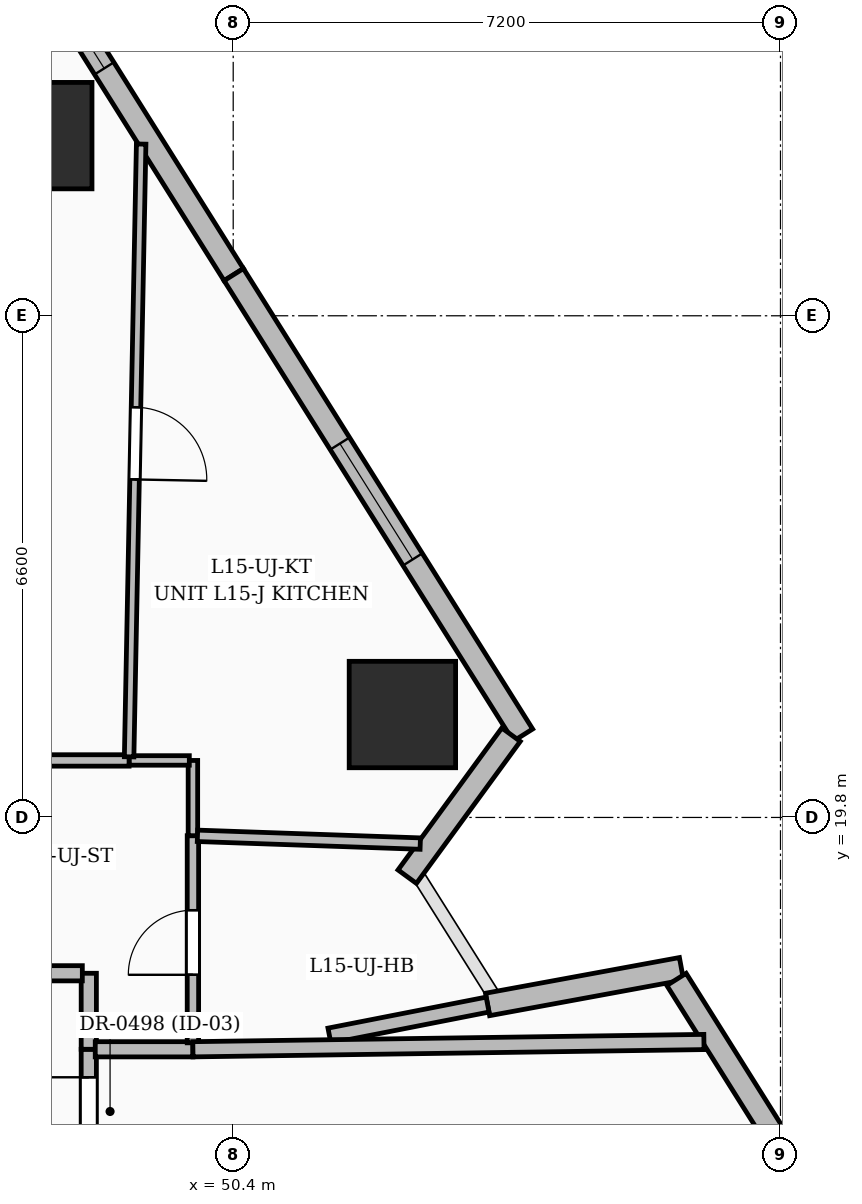
"""IFC4 building model, lengths in metres.
Left out: names, types, materials, properties, quantities, classifications, styles, units other than length and angle.
Written with IfcOpenShell. Run it as: python <this file> out.ifc"""

import sys

from ifc_helpers import new_model, si_unit, direction, frame, frame_2d, origin, origin_2d, place, context, subcontext, project, spatial, rectangle, extrude, element, fill, save


model = new_model("IFC4")
c1 = context("Model", 3, precision=1e-05, world=origin(), true_north=direction((0.0, 1.0)))
c2 = subcontext(c1, "Body", "Model", "MODEL_VIEW")
j1 = project(units=[si_unit("LENGTHUNIT", "METRE"), si_unit("PLANEANGLEUNIT", "RADIAN")], contexts=[c1])
p1 = place(None, origin())
s1 = spatial("IfcSite", under=j1, at=p1, CompositionType="ELEMENT")
p2 = place(p1, origin())
s2 = spatial("IfcBuilding", under=s1, at=p2, CompositionType="ELEMENT")
p3 = place(p2, frame((0.0, 0.0, 64.2)))
s3 = spatial("IfcBuildingStorey", under=s2, at=p3, CompositionType="ELEMENT", Elevation=64.2)
for number, where, z_axis, x_axis in (
    (1, (52.626, 21.154, 0.0), (0.0, 0.0, 1.0), (1.0, 0.0, 0.0)),
    (2, (47.842, 28.77, 0.0), (0.0, 0.0, 1.0), (1.0, 0.0, 0.0)),
):
    element("IfcColumn", number, at=place(p3, frame(where, z_axis=z_axis, x_axis=x_axis)), inside=s3, PredefinedType="COLUMN", context=c2, shape_type="SweptSolid", body=[
        extrude(rectangle(XDim=1.4, YDim=1.4, at=origin_2d()), origin(), (0.0, 0.0, 1.0), 3.6),
    ])
p4 = place(p3, frame((46.574, 33.044, 0.0), z_axis=(0.0, 0.0, 1.0), x_axis=(0.531903730452, -0.846804830839, 0.0)))
e3 = element("IfcWall", 3, at=p4, inside=s3, PredefinedType="SOLIDWALL", context=c2, shape_type="SweptSolid", body=[
    extrude(rectangle(XDim=7.207, YDim=0.3, at=frame_2d((3.604, 0.0))), origin(), (0.0, 0.0, 1.0), 3.35),
])
p5 = place(p4, frame((1.903, 0.0, 0.55)))
e4 = element("IfcOpeningElement", 4, at=p5, cuts=e3, PredefinedType="OPENING", context=c2, shape_type="SweptSolid", body=[
    extrude(rectangle(XDim=2.1, YDim=2.4, at=frame_2d((1.05, 1.2))), frame((0.0, 0.16, 0.0), z_axis=(0.0, -1.0, 0.0), x_axis=(1.0, 0.0, 0.0)), (0.0, 0.0, 1.0), 0.32),
])
p6 = place(p3, frame((50.407, 26.941, 0.0), z_axis=(0.0, 0.0, 1.0), x_axis=(0.531893353762, -0.846811348663, 0.0)))
e5 = element("IfcWall", 5, at=p6, inside=s3, PredefinedType="SOLIDWALL", context=c2, shape_type="SweptSolid", body=[
    extrude(rectangle(XDim=7.154, YDim=0.3, at=frame_2d((3.577, 0.0))), origin(), (0.0, 0.0, 1.0), 3.35),
])
p7 = place(p6, frame((2.625, 0.0, 0.6)))
e6 = element("IfcOpeningElement", 6, at=p7, cuts=e5, PredefinedType="OPENING", context=c2, shape_type="SweptSolid", body=[
    extrude(rectangle(XDim=1.8, YDim=2.1, at=frame_2d((0.9, 1.05))), frame((0.0, 0.16, 0.0), z_axis=(0.0, -1.0, 0.0), x_axis=(1.0, 0.0, 0.0)), (0.0, 0.0, 1.0), 0.32),
])
p8 = place(p3, frame((54.055, 20.889, 0.0), z_axis=(0.0, 0.0, 1.0), x_axis=(-0.590283720268, -0.80719584339, 0.0)))
e7 = element("IfcWall", 7, at=p8, inside=s3, PredefinedType="SOLIDWALL", context=c2, shape_type="SweptSolid", body=[
    extrude(rectangle(XDim=2.314, YDim=0.3, at=frame_2d((1.157, 0.0))), origin(), (0.0, 0.0, 1.0), 2.375),
])
p9 = place(p3, frame((53.746, 17.34, 0.0), z_axis=(0.0, 0.0, 1.0), x_axis=(0.983469951812, 0.181071405482, 0.0)))
e8 = element("IfcWall", 8, at=p9, inside=s3, PredefinedType="SOLIDWALL", context=c2, shape_type="SweptSolid", body=[
    extrude(rectangle(XDim=2.594, YDim=0.3, at=frame_2d((1.297, 0.0))), origin(), (0.0, 0.0, 1.0), 2.375),
])
p10 = place(p3, frame((56.232, 17.67, 0.0), z_axis=(0.0, 0.0, 1.0), x_axis=(0.531902990752, -0.846805295466, 0.0)))
e9 = element("IfcWall", 9, at=p10, inside=s3, PredefinedType="SOLIDWALL", context=c2, shape_type="SweptSolid", body=[
    extrude(rectangle(XDim=6.703, YDim=0.3, at=frame_2d((3.352, 0.0))), origin(), (0.0, 0.0, 1.0), 3.35),
])
p11 = place(p10, frame((2.9, 0.0, 0.8)))
e10 = element("IfcOpeningElement", 10, at=p11, cuts=e9, PredefinedType="OPENING", context=c2, shape_type="SweptSolid", body=[
    extrude(rectangle(XDim=1.2, YDim=1.8, at=frame_2d((0.6, 0.9))), frame((0.0, 0.16, 0.0), z_axis=(0.0, -1.0, 0.0), x_axis=(1.0, 0.0, 0.0)), (0.0, 0.0, 1.0), 0.32),
])
p12 = place(p3, frame((48.5, 14.285, 0.0), z_axis=(0.0, 0.0, 1.0), x_axis=(0.0, 1.0, 0.0)))
e11 = element("IfcWall", 11, at=p12, inside=s3, PredefinedType="PARTITIONING", context=c2, shape_type="SweptSolid", body=[
    extrude(rectangle(XDim=2.465, YDim=0.2, at=frame_2d((1.232, 0.0))), origin(), (0.0, 0.0, 1.0), 2.279),
])
p13 = place(p12, frame((1.197, 0.0, 0.0)))
e12 = element("IfcOpeningElement", 12, at=p13, cuts=e11, PredefinedType="OPENING", context=c2, shape_type="SweptSolid", body=[
    extrude(rectangle(XDim=0.9, YDim=2.1, at=frame_2d((0.45, 1.05))), frame((0.0, 0.11, 0.0), z_axis=(0.0, -1.0, 0.0), x_axis=(1.0, 0.0, 0.0)), (0.0, 0.0, 1.0), 0.22),
])
p14 = place(p3, frame((48.5, 16.75, 0.0), z_axis=(0.0, 0.0, 1.0), x_axis=(0.0, 1.0, 0.0)))
e13 = element("IfcWall", 13, at=p14, inside=s3, PredefinedType="PARTITIONING", context=c2, shape_type="SweptSolid", body=[
    extrude(rectangle(XDim=1.0, YDim=0.2, at=frame_2d((0.5, 0.0))), origin(), (0.0, 0.0, 1.0), 2.279),
])
p15 = place(p3, frame((48.415, 17.75, 0.0), z_axis=(0.0, 0.0, 1.0), x_axis=(-1.0, 0.0, 0.0)))
e14 = element("IfcWall", 14, at=p15, inside=s3, PredefinedType="PARTITIONING", context=c2, shape_type="SweptSolid", body=[
    extrude(rectangle(XDim=4.785, YDim=0.2, at=frame_2d((2.393, 0.0))), origin(), (0.0, 0.0, 1.0), 2.309),
])
p16 = place(p15, frame((1.611, 0.0, 0.0)))
e15 = element("IfcOpeningElement", 15, at=p16, cuts=e14, PredefinedType="OPENING", context=c2, shape_type="SweptSolid", body=[
    extrude(rectangle(XDim=1.0, YDim=2.2, at=frame_2d((0.5, 1.1))), frame((0.0, 0.11, 0.0), z_axis=(0.0, -1.0, 0.0), x_axis=(1.0, 0.0, 0.0)), (0.0, 0.0, 1.0), 0.22),
])
p17 = place(p3, frame((49.87, 16.75, 0.0), z_axis=(0.0, 0.0, 1.0), x_axis=(-1.0, 0.0, 0.0)))
e16 = element("IfcWall", 16, at=p17, inside=s3, PredefinedType="PARTITIONING", context=c2, shape_type="SweptSolid", body=[
    extrude(rectangle(XDim=1.285, YDim=0.2, at=frame_2d((0.643, 0.0))), origin(), (0.0, 0.0, 1.0), 2.279),
])
p18 = place(p3, frame((53.747, 17.338, 0.0), z_axis=(0.0, 0.0, 1.0), x_axis=(-0.981321847167, -0.192373158918, 0.0)))
e17 = element("IfcWall", 17, at=p18, inside=s3, PredefinedType="PARTITIONING", context=c2, shape_type="SweptSolid", body=[
    extrude(rectangle(XDim=2.121, YDim=0.2, at=frame_2d((1.06, 0.0))), origin(), (0.0, 0.0, 1.0), 2.771),
])
p19 = place(p3, frame((49.87, 16.835, 0.0), z_axis=(0.0, 0.0, 1.0), x_axis=(0.0, 1.0, 0.0)))
e18 = element("IfcWall", 18, at=p19, inside=s3, PredefinedType="PARTITIONING", context=c2, shape_type="SweptSolid", body=[
    extrude(rectangle(XDim=2.725, YDim=0.15, at=frame_2d((1.363, 0.0))), origin(), (0.0, 0.0, 1.0), 2.279),
])
p20 = place(p19, frame((0.895, 0.0, 0.0)))
e19 = element("IfcOpeningElement", 19, at=p20, cuts=e18, PredefinedType="OPENING", context=c2, shape_type="SweptSolid", body=[
    extrude(rectangle(XDim=0.85, YDim=2.1, at=frame_2d((0.425, 1.05))), frame((0.0, 0.085, 0.0), z_axis=(0.0, -1.0, 0.0), x_axis=(1.0, 0.0, 0.0)), (0.0, 0.0, 1.0), 0.17),
])
p21 = place(p3, frame((49.87, 19.56, 0.0), z_axis=(0.0, 0.0, 1.0), x_axis=(0.0, 1.0, 0.0)))
e20 = element("IfcWall", 20, at=p21, inside=s3, PredefinedType="PARTITIONING", context=c2, shape_type="SweptSolid", body=[
    extrude(rectangle(XDim=0.99, YDim=0.125, at=frame_2d((0.495, 0.0))), origin(), (0.0, 0.0, 1.0), 3.35),
])
p22 = place(p3, frame((49.823, 20.55, 0.0), z_axis=(0.0, 0.0, 1.0), x_axis=(-1.0, 0.0, 0.0)))
e21 = element("IfcWall", 21, at=p22, inside=s3, PredefinedType="PARTITIONING", context=c2, shape_type="SweptSolid", body=[
    extrude(rectangle(XDim=0.792, YDim=0.125, at=frame_2d((0.396, 0.0))), origin(), (0.0, 0.0, 1.0), 3.35),
])
p23 = place(p3, frame((49.03, 20.55, 0.0), z_axis=(0.0, 0.0, 1.0), x_axis=(-1.0, 0.0, 0.0)))
e22 = element("IfcWall", 22, at=p23, inside=s3, PredefinedType="PARTITIONING", context=c2, shape_type="SweptSolid", body=[
    extrude(rectangle(XDim=4.845, YDim=0.15, at=frame_2d((2.422, 0.0))), origin(), (0.0, 0.0, 1.0), 2.279),
])
p24 = place(p23, frame((2.05, 0.0, 0.0)))
e23 = element("IfcOpeningElement", 23, at=p24, cuts=e22, PredefinedType="OPENING", context=c2, shape_type="SweptSolid", body=[
    extrude(rectangle(XDim=0.95, YDim=2.2, at=frame_2d((0.475, 1.1))), frame((0.0, 0.085, 0.0), z_axis=(0.0, -1.0, 0.0), x_axis=(1.0, 0.0, 0.0)), (0.0, 0.0, 1.0), 0.17),
])
p25 = place(p3, frame((52.861, 19.456, 0.0), z_axis=(0.0, 0.0, 1.0), x_axis=(-0.999391578041, 0.034877983608, 0.0)))
e24 = element("IfcWall", 24, at=p25, inside=s3, PredefinedType="PARTITIONING", context=c2, shape_type="SweptSolid", body=[
    extrude(rectangle(XDim=2.933, YDim=0.15, at=frame_2d((1.466, 0.0))), origin(), (0.0, 0.0, 1.0), 2.279),
])
p26 = place(p3, frame((49.189, 28.659, 0.0), z_axis=(0.0, 0.0, 1.0), x_axis=(-0.019620692223, -0.999807495689, 0.0)))
e25 = element("IfcWall", 25, at=p26, inside=s3, PredefinedType="PARTITIONING", context=c2, shape_type="SweptSolid", body=[
    extrude(rectangle(XDim=8.063, YDim=0.125, at=frame_2d((4.031, 0.0))), origin(), (0.0, 0.0, 1.0), 2.37),
])
p27 = place(p26, frame((3.463, 0.0, 0.0)))
e26 = element("IfcOpeningElement", 26, at=p27, cuts=e25, PredefinedType="OPENING", context=c2, shape_type="SweptSolid", body=[
    extrude(rectangle(XDim=0.95, YDim=2.2, at=frame_2d((0.475, 1.1))), frame((0.0, 0.072, 0.0), z_axis=(0.0, -1.0, 0.0), x_axis=(1.0, 0.0, 0.0)), (0.0, 0.0, 1.0), 0.145),
])
p28 = place(p3, frame((56.593, 16.846, 0.0), z_axis=(0.0, 0.0, 1.0), x_axis=(-0.999898174742, -0.014270253937, 0.0)))
e27 = element("IfcWall", 27, at=p28, inside=s3, PredefinedType="PARTITIONING", context=c2, shape_type="SweptSolid", body=[
    extrude(rectangle(XDim=6.724, YDim=0.2, at=frame_2d((3.362, 0.0))), origin(), (0.0, 0.0, 1.0), 2.37),
])
p29 = place(p5, origin())
e28 = element("IfcWindow", 28, at=p29, inside=s3, PartitioningType="SINGLE_PANEL", PredefinedType="WINDOW", context=c2, shape_type="SweptSolid", body=[
    extrude(rectangle(XDim=2.1, YDim=2.4, at=frame_2d((1.05, 1.2))), frame((0.0, 0.03, 0.0), z_axis=(0.0, -1.0, 0.0), x_axis=(1.0, 0.0, 0.0)), (0.0, 0.0, 1.0), 0.06),
])
fill(e4, e28)
p30 = place(p7, origin())
e29 = element("IfcWindow", 29, at=p30, inside=s3, PartitioningType="SINGLE_PANEL", PredefinedType="WINDOW", context=c2, shape_type="SweptSolid", body=[
    extrude(rectangle(XDim=1.8, YDim=2.1, at=frame_2d((0.9, 1.05))), frame((0.0, 0.03, 0.0), z_axis=(0.0, -1.0, 0.0), x_axis=(1.0, 0.0, 0.0)), (0.0, 0.0, 1.0), 0.06),
])
fill(e6, e29)
p31 = place(p13, origin())
e30 = element("IfcDoor", 30, at=p31, inside=s3, OperationType="SINGLE_SWING_RIGHT", PredefinedType="DOOR", context=c2, shape_type="SweptSolid", body=[
    extrude(rectangle(XDim=0.9, YDim=2.1, at=frame_2d((0.45, 1.05))), frame((0.0, 0.025, 0.0), z_axis=(0.0, -1.0, 0.0), x_axis=(1.0, 0.0, 0.0)), (0.0, 0.0, 1.0), 0.05),
])
fill(e12, e30)
p32 = place(p27, origin())
e31 = element("IfcDoor", 31, at=p32, inside=s3, OperationType="SINGLE_SWING_RIGHT", PredefinedType="DOOR", context=c2, shape_type="SweptSolid", body=[
    extrude(rectangle(XDim=0.95, YDim=2.2, at=frame_2d((0.475, 1.1))), frame((0.0, 0.025, 0.0), z_axis=(0.0, -1.0, 0.0), x_axis=(1.0, 0.0, 0.0)), (0.0, 0.0, 1.0), 0.05),
])
fill(e26, e31)
p33 = place(p20, origin())
e32 = element("IfcDoor", 32, at=p33, inside=s3, OperationType="SINGLE_SWING_LEFT", PredefinedType="DOOR", context=c2, shape_type="SweptSolid", body=[
    extrude(rectangle(XDim=0.85, YDim=2.1, at=frame_2d((0.425, 1.05))), frame((0.0, 0.025, 0.0), z_axis=(0.0, -1.0, 0.0), x_axis=(1.0, 0.0, 0.0)), (0.0, 0.0, 1.0), 0.05),
])
fill(e19, e32)
save(model, sys.argv[1])
